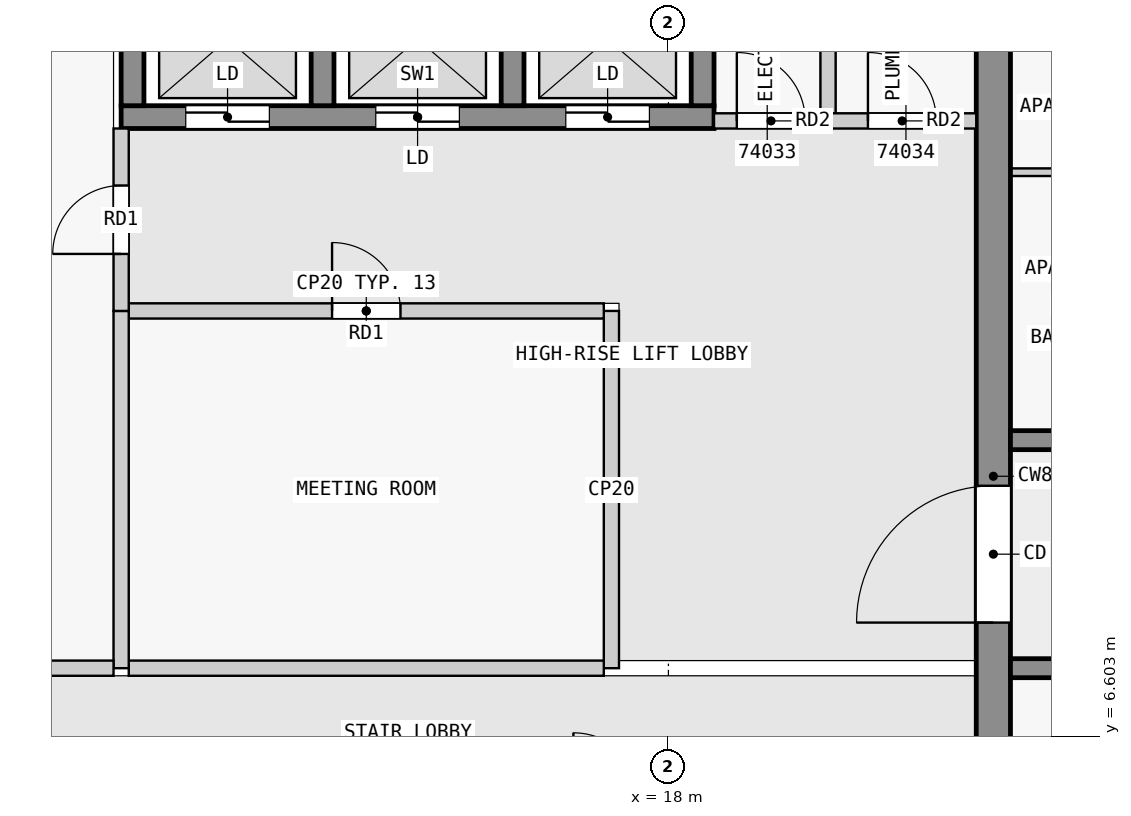
"""IFC4 building model, lengths in metres.
Left out: names, types, materials, properties, quantities, classifications, styles, units other than length and angle.
Written with IfcOpenShell. Run it as: python <this file> out.ifc"""

import sys

from ifc_helpers import new_model, si_unit, direction, frame, frame_2d, origin, place, context, subcontext, project, spatial, rectangle, extrude, element, fill, save


model = new_model("IFC4")
c1 = context("Model", 3, precision=1e-05, world=origin(), true_north=direction((0.0, 1.0)))
c2 = subcontext(c1, "Body", "Model", "MODEL_VIEW")
j1 = project(units=[si_unit("LENGTHUNIT", "METRE"), si_unit("PLANEANGLEUNIT", "RADIAN")], contexts=[c1])
p1 = place(None, origin())
s1 = spatial("IfcSite", under=j1, at=p1, CompositionType="ELEMENT")
p2 = place(p1, origin())
s2 = spatial("IfcBuilding", under=s1, at=p2, CompositionType="ELEMENT")
p3 = place(p2, frame((0.0, 0.0, 280.9)))
s3 = spatial("IfcBuildingStorey", under=s2, at=p3, CompositionType="ELEMENT", Elevation=280.9)
p4 = place(p3, frame((22.275, 2.5, 0.0), z_axis=(0.0, 0.0, 1.0), x_axis=(0.0, 1.0, 0.0)))
e1 = element("IfcWall", 1, at=p4, inside=s3, PredefinedType="SHEAR", context=c2, shape_type="SweptSolid", body=[
    extrude(rectangle(XDim=15.05, YDim=0.45, at=frame_2d((7.525, 0.0))), origin(), (0.0, 0.0, 1.0), 3.25),
])
p5 = place(p4, frame((5.6, 0.0, 0.0)))
e2 = element("IfcOpeningElement", 2, at=p5, cuts=e1, PredefinedType="OPENING", context=c2, shape_type="SweptSolid", body=[
    extrude(rectangle(XDim=1.8, YDim=2.1, at=frame_2d((0.9, 1.05))), frame((0.0, 0.235, 0.0), z_axis=(0.0, -1.0, 0.0), x_axis=(1.0, 0.0, 0.0)), (0.0, 0.0, 1.0), 0.47),
])
p6 = place(p3, frame((10.8, 14.75, 0.0), z_axis=(0.0, 0.0, 1.0), x_axis=(1.0, 0.0, 0.0)))
e3 = element("IfcWall", 3, at=p6, inside=s3, PredefinedType="SHEAR", context=c2, shape_type="SweptSolid", body=[
    extrude(rectangle(XDim=7.8, YDim=0.3, at=frame_2d((3.9, 0.0))), origin(), (0.0, 0.0, 1.0), 3.25),
])
p7 = place(p6, frame((0.85, 0.0, 0.0)))
e4 = element("IfcOpeningElement", 4, at=p7, cuts=e3, PredefinedType="OPENING", context=c2, shape_type="SweptSolid", body=[
    extrude(rectangle(XDim=1.1, YDim=2.1, at=frame_2d((0.55, 1.05))), frame((0.0, 0.16, 0.0), z_axis=(0.0, -1.0, 0.0), x_axis=(1.0, 0.0, 0.0)), (0.0, 0.0, 1.0), 0.32),
])
p8 = place(p6, frame((3.35, 0.0, 0.0)))
e5 = element("IfcOpeningElement", 5, at=p8, cuts=e3, PredefinedType="OPENING", context=c2, shape_type="SweptSolid", body=[
    extrude(rectangle(XDim=1.1, YDim=2.1, at=frame_2d((0.55, 1.05))), frame((0.0, 0.16, 0.0), z_axis=(0.0, -1.0, 0.0), x_axis=(1.0, 0.0, 0.0)), (0.0, 0.0, 1.0), 0.32),
])
p9 = place(p6, frame((5.85, 0.0, 0.0)))
e6 = element("IfcOpeningElement", 6, at=p9, cuts=e3, PredefinedType="OPENING", context=c2, shape_type="SweptSolid", body=[
    extrude(rectangle(XDim=1.1, YDim=2.1, at=frame_2d((0.55, 1.05))), frame((0.0, 0.16, 0.0), z_axis=(0.0, -1.0, 0.0), x_axis=(1.0, 0.0, 0.0)), (0.0, 0.0, 1.0), 0.32),
])
for number, where, z_axis, x_axis in (
    (7, (10.95, 14.9, 0.0), (0.0, 0.0, 1.0), (0.0, 1.0, 0.0)),
    (8, (13.45, 14.9, 0.0), (0.0, 0.0, 1.0), (0.0, 1.0, 0.0)),
    (9, (15.95, 14.9, 0.0), (0.0, 0.0, 1.0), (0.0, 1.0, 0.0)),
    (10, (18.45, 14.9, 0.0), (0.0, 0.0, 1.0), (0.0, 1.0, 0.0)),
):
    element("IfcWall", number, at=place(p3, frame(where, z_axis=z_axis, x_axis=x_axis)), inside=s3, PredefinedType="SHEAR", context=c2, shape_type="SweptSolid", body=[
        extrude(rectangle(XDim=2.0, YDim=0.3, at=frame_2d((1.0, 0.0))), origin(), (0.0, 0.0, 1.0), 3.25),
    ])
p10 = place(p3, frame((22.5, 7.5, 0.0), z_axis=(0.0, 0.0, 1.0), x_axis=(1.0, 0.0, 0.0)))
e11 = element("IfcWall", 11, at=p10, inside=s3, PredefinedType="SHEAR", context=c2, shape_type="SweptSolid", body=[
    extrude(rectangle(XDim=22.5, YDim=0.25, at=frame_2d((11.25, 0.0))), origin(), (0.0, 0.0, 1.0), 3.25),
])
p11 = place(p10, frame((1.75, 0.0, 0.0)))
e12 = element("IfcOpeningElement", 12, at=p11, cuts=e11, PredefinedType="OPENING", context=c2, shape_type="SweptSolid", body=[
    extrude(rectangle(XDim=1.0, YDim=2.1, at=frame_2d((0.5, 1.05))), frame((0.0, 0.135, 0.0), z_axis=(0.0, -1.0, 0.0), x_axis=(1.0, 0.0, 0.0)), (0.0, 0.0, 1.0), 0.27),
])
p12 = place(p10, frame((8.55, 0.0, 0.0)))
e13 = element("IfcOpeningElement", 13, at=p12, cuts=e11, PredefinedType="OPENING", context=c2, shape_type="SweptSolid", body=[
    extrude(rectangle(XDim=1.0, YDim=2.1, at=frame_2d((0.5, 1.05))), frame((0.0, 0.135, 0.0), z_axis=(0.0, -1.0, 0.0), x_axis=(1.0, 0.0, 0.0)), (0.0, 0.0, 1.0), 0.27),
])
p13 = place(p10, frame((15.25, 0.0, 0.0)))
e14 = element("IfcOpeningElement", 14, at=p13, cuts=e11, PredefinedType="OPENING", context=c2, shape_type="SweptSolid", body=[
    extrude(rectangle(XDim=1.0, YDim=2.1, at=frame_2d((0.5, 1.05))), frame((0.0, 0.135, 0.0), z_axis=(0.0, -1.0, 0.0), x_axis=(1.0, 0.0, 0.0)), (0.0, 0.0, 1.0), 0.27),
])
p14 = place(p10, frame((18.75, 0.0, 0.0)))
e15 = element("IfcOpeningElement", 15, at=p14, cuts=e11, PredefinedType="OPENING", context=c2, shape_type="SweptSolid", body=[
    extrude(rectangle(XDim=0.9, YDim=2.1, at=frame_2d((0.45, 1.05))), frame((0.0, 0.135, 0.0), z_axis=(0.0, -1.0, 0.0), x_axis=(1.0, 0.0, 0.0)), (0.0, 0.0, 1.0), 0.27),
])
p15 = place(p10, frame((20.95, 0.0, 0.0)))
e16 = element("IfcOpeningElement", 16, at=p15, cuts=e11, PredefinedType="OPENING", context=c2, shape_type="SweptSolid", body=[
    extrude(rectangle(XDim=1.0, YDim=2.1, at=frame_2d((0.5, 1.05))), frame((0.0, 0.135, 0.0), z_axis=(0.0, -1.0, 0.0), x_axis=(1.0, 0.0, 0.0)), (0.0, 0.0, 1.0), 0.27),
])
p16 = place(p3, frame((22.5, 10.5, 0.0), z_axis=(0.0, 0.0, 1.0), x_axis=(1.0, 0.0, 0.0)))
e17 = element("IfcWall", 17, at=p16, inside=s3, PredefinedType="SHEAR", context=c2, shape_type="SweptSolid", body=[
    extrude(rectangle(XDim=22.5, YDim=0.25, at=frame_2d((11.25, 0.0))), origin(), (0.0, 0.0, 1.0), 3.25),
])
p17 = place(p16, frame((4.05, 0.0, 0.0)))
e18 = element("IfcOpeningElement", 18, at=p17, cuts=e17, PredefinedType="OPENING", context=c2, shape_type="SweptSolid", body=[
    extrude(rectangle(XDim=1.0, YDim=2.1, at=frame_2d((0.5, 1.05))), frame((0.0, 0.135, 0.0), z_axis=(0.0, -1.0, 0.0), x_axis=(1.0, 0.0, 0.0)), (0.0, 0.0, 1.0), 0.27),
])
p18 = place(p16, frame((10.35, 0.0, 0.0)))
e19 = element("IfcOpeningElement", 19, at=p18, cuts=e17, PredefinedType="OPENING", context=c2, shape_type="SweptSolid", body=[
    extrude(rectangle(XDim=1.8, YDim=2.1, at=frame_2d((0.9, 1.05))), frame((0.0, 0.135, 0.0), z_axis=(0.0, -1.0, 0.0), x_axis=(1.0, 0.0, 0.0)), (0.0, 0.0, 1.0), 0.27),
])
p19 = place(p16, frame((16.85, 0.0, 0.0)))
e20 = element("IfcOpeningElement", 20, at=p19, cuts=e17, PredefinedType="OPENING", context=c2, shape_type="SweptSolid", body=[
    extrude(rectangle(XDim=1.0, YDim=2.1, at=frame_2d((0.5, 1.05))), frame((0.0, 0.135, 0.0), z_axis=(0.0, -1.0, 0.0), x_axis=(1.0, 0.0, 0.0)), (0.0, 0.0, 1.0), 0.27),
])
p20 = place(p3, frame((7.1, 7.5, 0.0), z_axis=(0.0, 0.0, 1.0), x_axis=(1.0, 0.0, 0.0)))
e21 = element("IfcWall", 21, at=p20, inside=s3, PredefinedType="PARTITIONING", context=c2, shape_type="SweptSolid", body=[
    extrude(rectangle(XDim=3.6, YDim=0.2, at=frame_2d((1.8, 0.0))), origin(), (0.0, 0.0, 1.0), 3.25),
])
p21 = place(p3, frame((10.8, 12.2, 0.0), z_axis=(0.0, 0.0, 1.0), x_axis=(0.0, 1.0, 0.0)))
e22 = element("IfcWall", 22, at=p21, inside=s3, PredefinedType="PARTITIONING", context=c2, shape_type="SweptSolid", body=[
    extrude(rectangle(XDim=2.4, YDim=0.2, at=frame_2d((1.2, 0.0))), origin(), (0.0, 0.0, 1.0), 3.25),
])
p22 = place(p21, frame((0.75, 0.0, 0.0)))
e23 = element("IfcOpeningElement", 23, at=p22, cuts=e22, PredefinedType="OPENING", context=c2, shape_type="SweptSolid", body=[
    extrude(rectangle(XDim=0.9, YDim=2.1, at=frame_2d((0.45, 1.05))), frame((0.0, 0.11, 0.0), z_axis=(0.0, -1.0, 0.0), x_axis=(1.0, 0.0, 0.0)), (0.0, 0.0, 1.0), 0.22),
])
p23 = place(p3, frame((10.8, 7.5, 0.0), z_axis=(0.0, 0.0, 1.0), x_axis=(0.0, 1.0, 0.0)))
e24 = element("IfcWall", 24, at=p23, inside=s3, PredefinedType="PARTITIONING", context=c2, shape_type="SweptSolid", body=[
    extrude(rectangle(XDim=4.7, YDim=0.2, at=frame_2d((2.35, 0.0))), origin(), (0.0, 0.0, 1.0), 3.25),
])
p24 = place(p3, frame((10.9, 7.5, 0.0), z_axis=(0.0, 0.0, 1.0), x_axis=(1.0, 0.0, 0.0)))
e25 = element("IfcWall", 25, at=p24, inside=s3, PredefinedType="PARTITIONING", context=c2, shape_type="SweptSolid", body=[
    extrude(rectangle(XDim=6.25, YDim=0.2, at=frame_2d((3.125, 0.0))), origin(), (0.0, 0.0, 1.0), 3.25),
])
p25 = place(p3, frame((17.25, 7.5, 0.0), z_axis=(0.0, 0.0, 1.0), x_axis=(0.0, 1.0, 0.0)))
e26 = element("IfcWall", 26, at=p25, inside=s3, PredefinedType="PARTITIONING", context=c2, shape_type="SweptSolid", body=[
    extrude(rectangle(XDim=4.7, YDim=0.2, at=frame_2d((2.35, 0.0))), origin(), (0.0, 0.0, 1.0), 3.25),
])
p26 = place(p3, frame((10.9, 12.2, 0.0), z_axis=(0.0, 0.0, 1.0), x_axis=(1.0, 0.0, 0.0)))
e27 = element("IfcWall", 27, at=p26, inside=s3, PredefinedType="PARTITIONING", context=c2, shape_type="SweptSolid", body=[
    extrude(rectangle(XDim=6.25, YDim=0.2, at=frame_2d((3.125, 0.0))), origin(), (0.0, 0.0, 1.0), 3.25),
])
p27 = place(p26, frame((2.675, 0.0, 0.0)))
e28 = element("IfcOpeningElement", 28, at=p27, cuts=e27, PredefinedType="OPENING", context=c2, shape_type="SweptSolid", body=[
    extrude(rectangle(XDim=0.9, YDim=2.1, at=frame_2d((0.45, 1.05))), frame((0.0, 0.11, 0.0), z_axis=(0.0, -1.0, 0.0), x_axis=(1.0, 0.0, 0.0)), (0.0, 0.0, 1.0), 0.22),
])
p28 = place(p3, frame((18.6, 14.7, 0.0), z_axis=(0.0, 0.0, 1.0), x_axis=(1.0, 0.0, 0.0)))
e29 = element("IfcWall", 29, at=p28, inside=s3, PredefinedType="PARTITIONING", context=c2, shape_type="SweptSolid", body=[
    extrude(rectangle(XDim=3.45, YDim=0.2, at=frame_2d((1.725, 0.0))), origin(), (0.0, 0.0, 1.0), 3.25),
])
p29 = place(p28, frame((0.3, 0.0, 0.0)))
e30 = element("IfcOpeningElement", 30, at=p29, cuts=e29, PredefinedType="OPENING", context=c2, shape_type="SweptSolid", body=[
    extrude(rectangle(XDim=0.9, YDim=2.1, at=frame_2d((0.45, 1.05))), frame((0.0, 0.11, 0.0), z_axis=(0.0, -1.0, 0.0), x_axis=(1.0, 0.0, 0.0)), (0.0, 0.0, 1.0), 0.22),
])
p30 = place(p28, frame((2.025, 0.0, 0.0)))
e31 = element("IfcOpeningElement", 31, at=p30, cuts=e29, PredefinedType="OPENING", context=c2, shape_type="SweptSolid", body=[
    extrude(rectangle(XDim=0.9, YDim=2.1, at=frame_2d((0.45, 1.05))), frame((0.0, 0.11, 0.0), z_axis=(0.0, -1.0, 0.0), x_axis=(1.0, 0.0, 0.0)), (0.0, 0.0, 1.0), 0.22),
])
p31 = place(p3, frame((20.1, 14.8, 0.0), z_axis=(0.0, 0.0, 1.0), x_axis=(0.0, 1.0, 0.0)))
e32 = element("IfcWall", 32, at=p31, inside=s3, PredefinedType="PARTITIONING", context=c2, shape_type="SweptSolid", body=[
    extrude(rectangle(XDim=2.75, YDim=0.2, at=frame_2d((1.375, 0.0))), origin(), (0.0, 0.0, 1.0), 3.25),
])
p32 = place(p3, frame((24.25, 14.025, 0.0), z_axis=(0.0, 0.0, 1.0), x_axis=(-1.0, 0.0, 0.0)))
e33 = element("IfcWall", 33, at=p32, inside=s3, PredefinedType="PARTITIONING", context=c2, shape_type="SweptSolid", body=[
    extrude(rectangle(XDim=1.75, YDim=0.1, at=frame_2d((0.875, 0.0))), origin(), (0.0, 0.0, 1.0), 3.25),
])
p33 = place(p22, origin())
e34 = element("IfcDoor", 34, at=p33, inside=s3, OperationType="SINGLE_SWING_LEFT", PredefinedType="DOOR", context=c2, shape_type="SweptSolid", body=[
    extrude(rectangle(XDim=0.9, YDim=2.1, at=frame_2d((0.45, 1.05))), frame((0.0, 0.025, 0.0), z_axis=(0.0, -1.0, 0.0), x_axis=(1.0, 0.0, 0.0)), (0.0, 0.0, 1.0), 0.05),
])
fill(e23, e34)
p34 = place(p27, origin())
e35 = element("IfcDoor", 35, at=p34, inside=s3, OperationType="SINGLE_SWING_LEFT", PredefinedType="DOOR", context=c2, shape_type="SweptSolid", body=[
    extrude(rectangle(XDim=0.9, YDim=2.1, at=frame_2d((0.45, 1.05))), frame((0.0, 0.025, 0.0), z_axis=(0.0, -1.0, 0.0), x_axis=(1.0, 0.0, 0.0)), (0.0, 0.0, 1.0), 0.05),
])
fill(e28, e35)
p35 = place(p7, origin())
e36 = element("IfcDoor", 36, at=p35, inside=s3, OperationType="DOUBLE_DOOR_SLIDING", PredefinedType="DOOR", context=c2, shape_type="SweptSolid", body=[
    extrude(rectangle(XDim=1.1, YDim=2.1, at=frame_2d((0.55, 1.05))), frame((0.0, 0.025, 0.0), z_axis=(0.0, -1.0, 0.0), x_axis=(1.0, 0.0, 0.0)), (0.0, 0.0, 1.0), 0.05),
])
fill(e4, e36)
p36 = place(p8, origin())
e37 = element("IfcDoor", 37, at=p36, inside=s3, OperationType="DOUBLE_DOOR_SLIDING", PredefinedType="DOOR", context=c2, shape_type="SweptSolid", body=[
    extrude(rectangle(XDim=1.1, YDim=2.1, at=frame_2d((0.55, 1.05))), frame((0.0, 0.025, 0.0), z_axis=(0.0, -1.0, 0.0), x_axis=(1.0, 0.0, 0.0)), (0.0, 0.0, 1.0), 0.05),
])
fill(e5, e37)
p37 = place(p9, origin())
e38 = element("IfcDoor", 38, at=p37, inside=s3, OperationType="DOUBLE_DOOR_SLIDING", PredefinedType="DOOR", context=c2, shape_type="SweptSolid", body=[
    extrude(rectangle(XDim=1.1, YDim=2.1, at=frame_2d((0.55, 1.05))), frame((0.0, 0.025, 0.0), z_axis=(0.0, -1.0, 0.0), x_axis=(1.0, 0.0, 0.0)), (0.0, 0.0, 1.0), 0.05),
])
fill(e6, e38)
p38 = place(p5, origin())
e39 = element("IfcDoor", 39, at=p38, inside=s3, OperationType="DOUBLE_DOOR_SINGLE_SWING", PredefinedType="DOOR", context=c2, shape_type="SweptSolid", body=[
    extrude(rectangle(XDim=1.8, YDim=2.1, at=frame_2d((0.9, 1.05))), frame((0.0, 0.025, 0.0), z_axis=(0.0, -1.0, 0.0), x_axis=(1.0, 0.0, 0.0)), (0.0, 0.0, 1.0), 0.05),
])
fill(e2, e39)
p39 = place(p29, origin())
e40 = element("IfcDoor", 40, at=p39, inside=s3, OperationType="SINGLE_SWING_LEFT", PredefinedType="DOOR", context=c2, shape_type="SweptSolid", body=[
    extrude(rectangle(XDim=0.9, YDim=2.1, at=frame_2d((0.45, 1.05))), frame((0.0, 0.025, 0.0), z_axis=(0.0, -1.0, 0.0), x_axis=(1.0, 0.0, 0.0)), (0.0, 0.0, 1.0), 0.05),
])
fill(e30, e40)
p40 = place(p30, origin())
e41 = element("IfcDoor", 41, at=p40, inside=s3, OperationType="SINGLE_SWING_LEFT", PredefinedType="DOOR", context=c2, shape_type="SweptSolid", body=[
    extrude(rectangle(XDim=0.9, YDim=2.1, at=frame_2d((0.45, 1.05))), frame((0.0, 0.025, 0.0), z_axis=(0.0, -1.0, 0.0), x_axis=(1.0, 0.0, 0.0)), (0.0, 0.0, 1.0), 0.05),
])
fill(e31, e41)
save(model, sys.argv[1])
